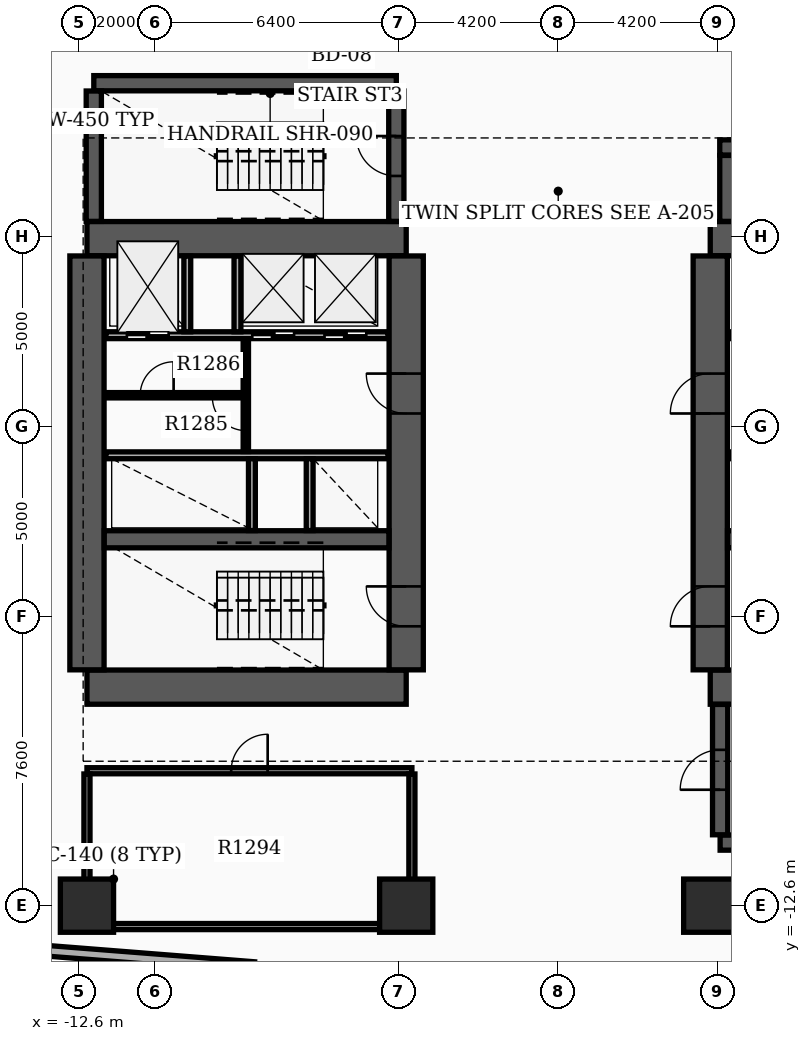
"""IFC4 building model, lengths in metres.
Left out: names, types, materials, properties, quantities, classifications, styles, units other than length and angle.
Written with IfcOpenShell. Run it as: python <this file> out.ifc"""

import sys

from ifc_helpers import new_model, si_unit, direction, frame, frame_2d, origin, origin_2d, place, context, subcontext, project, spatial, rectangle, extrude, element, fill, save


model = new_model("IFC4")
c1 = context("Model", 3, precision=1e-05, world=origin(), true_north=direction((0.0, 1.0)))
c2 = subcontext(c1, "Body", "Model", "MODEL_VIEW")
j1 = project(units=[si_unit("LENGTHUNIT", "METRE"), si_unit("PLANEANGLEUNIT", "RADIAN")], contexts=[c1])
p1 = place(None, origin())
s1 = spatial("IfcSite", under=j1, at=p1, CompositionType="ELEMENT")
p2 = place(p1, origin())
s2 = spatial("IfcBuilding", under=s1, at=p2, CompositionType="ELEMENT")
p3 = place(p2, frame((0.0, 0.0, 83.4)))
s3 = spatial("IfcBuildingStorey", under=s2, at=p3, CompositionType="ELEMENT", Elevation=83.4)
for number, where, z_axis, x_axis in (
    (1, (-12.4, -6.85, 0.0), (0.0, 0.0, 1.0), (1.0, 0.0, 0.0)),
    (2, (-12.4, 4.95, 0.0), (0.0, 0.0, 1.0), (1.0, 0.0, 0.0)),
):
    element("IfcWall", number, at=place(p3, frame(where, z_axis=z_axis, x_axis=x_axis)), inside=s3, PredefinedType="SHEAR", context=c2, shape_type="SweptSolid", body=[
        extrude(rectangle(XDim=8.4, YDim=0.9, at=frame_2d((4.2, 0.0))), origin(), (0.0, 0.0, 1.0), 3.7),
    ])
p4 = place(p3, frame((-12.4, -6.395, 0.0), z_axis=(0.0, 0.0, 1.0), x_axis=(0.0, 1.0, 0.0)))
e3 = element("IfcWall", 3, at=p4, inside=s3, PredefinedType="SHEAR", context=c2, shape_type="SweptSolid", body=[
    extrude(rectangle(XDim=10.89, YDim=0.9, at=frame_2d((5.445, 0.0))), origin(), (0.0, 0.0, 1.0), 3.7),
])
p5 = place(p3, frame((-4.0, -6.395, 0.0), z_axis=(0.0, 0.0, 1.0), x_axis=(0.0, 1.0, 0.0)))
e4 = element("IfcWall", 4, at=p5, inside=s3, PredefinedType="SHEAR", context=c2, shape_type="SweptSolid", body=[
    extrude(rectangle(XDim=10.89, YDim=0.9, at=frame_2d((5.445, 0.0))), origin(), (0.0, 0.0, 1.0), 3.7),
])
p6 = place(p5, frame((1.145, 0.0, 0.0)))
e5 = element("IfcOpeningElement", 5, at=p6, cuts=e4, PredefinedType="OPENING", context=c2, shape_type="SweptSolid", body=[
    extrude(rectangle(XDim=1.05, YDim=2.15, at=frame_2d((0.525, 1.075))), frame((0.0, 0.46, 0.0), z_axis=(0.0, -1.0, 0.0), x_axis=(1.0, 0.0, 0.0)), (0.0, 0.0, 1.0), 0.92),
])
p7 = place(p5, frame((6.745, 0.0, 0.0)))
e6 = element("IfcOpeningElement", 6, at=p7, cuts=e4, PredefinedType="OPENING", context=c2, shape_type="SweptSolid", body=[
    extrude(rectangle(XDim=1.05, YDim=2.15, at=frame_2d((0.525, 1.075))), frame((0.0, 0.46, 0.0), z_axis=(0.0, -1.0, 0.0), x_axis=(1.0, 0.0, 0.0)), (0.0, 0.0, 1.0), 0.92),
])
p8 = place(p3, frame((-11.945, -2.96, 0.0), z_axis=(0.0, 0.0, 1.0), x_axis=(1.0, 0.0, 0.0)))
e7 = element("IfcWall", 7, at=p8, inside=s3, PredefinedType="SHEAR", context=c2, shape_type="SweptSolid", body=[
    extrude(rectangle(XDim=7.49, YDim=0.45, at=frame_2d((3.745, 0.0))), origin(), (0.0, 0.0, 1.0), 3.7),
])
for number, where, z_axis, x_axis in (
    (8, (4.0, -6.85, 0.0), (0.0, 0.0, 1.0), (1.0, 0.0, 0.0)),
    (9, (4.0, 4.95, 0.0), (0.0, 0.0, 1.0), (1.0, 0.0, 0.0)),
):
    element("IfcWall", number, at=place(p3, frame(where, z_axis=z_axis, x_axis=x_axis)), inside=s3, PredefinedType="SHEAR", context=c2, shape_type="SweptSolid", body=[
        extrude(rectangle(XDim=8.4, YDim=0.9, at=frame_2d((4.2, 0.0))), origin(), (0.0, 0.0, 1.0), 3.7),
    ])
p9 = place(p3, frame((4.0, -6.395, 0.0), z_axis=(0.0, 0.0, 1.0), x_axis=(0.0, 1.0, 0.0)))
e10 = element("IfcWall", 10, at=p9, inside=s3, PredefinedType="SHEAR", context=c2, shape_type="SweptSolid", body=[
    extrude(rectangle(XDim=10.89, YDim=0.9, at=frame_2d((5.445, 0.0))), origin(), (0.0, 0.0, 1.0), 3.7),
])
p10 = place(p9, frame((1.145, 0.0, 0.0)))
e11 = element("IfcOpeningElement", 11, at=p10, cuts=e10, PredefinedType="OPENING", context=c2, shape_type="SweptSolid", body=[
    extrude(rectangle(XDim=1.05, YDim=2.15, at=frame_2d((0.525, 1.075))), frame((0.0, 0.46, 0.0), z_axis=(0.0, -1.0, 0.0), x_axis=(1.0, 0.0, 0.0)), (0.0, 0.0, 1.0), 0.92),
])
p11 = place(p9, frame((6.745, 0.0, 0.0)))
e12 = element("IfcOpeningElement", 12, at=p11, cuts=e10, PredefinedType="OPENING", context=c2, shape_type="SweptSolid", body=[
    extrude(rectangle(XDim=1.05, YDim=2.15, at=frame_2d((0.525, 1.075))), frame((0.0, 0.46, 0.0), z_axis=(0.0, -1.0, 0.0), x_axis=(1.0, 0.0, 0.0)), (0.0, 0.0, 1.0), 0.92),
])
p12 = place(p3, frame((4.455, -2.96, 0.0), z_axis=(0.0, 0.0, 1.0), x_axis=(1.0, 0.0, 0.0)))
e13 = element("IfcWall", 13, at=p12, inside=s3, PredefinedType="SHEAR", context=c2, shape_type="SweptSolid", body=[
    extrude(rectangle(XDim=7.49, YDim=0.45, at=frame_2d((3.745, 0.0))), origin(), (0.0, 0.0, 1.0), 3.7),
])
p13 = place(p3, frame((-12.22, 9.04, 0.0), z_axis=(0.0, 0.0, 1.0), x_axis=(1.0, 0.0, 0.0)))
e14 = element("IfcWall", 14, at=p13, inside=s3, PredefinedType="SHEAR", context=c2, shape_type="SweptSolid", body=[
    extrude(rectangle(XDim=7.96, YDim=0.4, at=frame_2d((3.98, 0.0))), origin(), (0.0, 0.0, 1.0), 3.7),
])
p14 = place(p3, frame((-12.22, 5.405, 0.0), z_axis=(0.0, 0.0, 1.0), x_axis=(0.0, 1.0, 0.0)))
e15 = element("IfcWall", 15, at=p14, inside=s3, PredefinedType="SHEAR", context=c2, shape_type="SweptSolid", body=[
    extrude(rectangle(XDim=3.43, YDim=0.4, at=frame_2d((1.715, 0.0))), origin(), (0.0, 0.0, 1.0), 3.7),
])
p15 = place(p3, frame((-4.26, 5.405, 0.0), z_axis=(0.0, 0.0, 1.0), x_axis=(0.0, 1.0, 0.0)))
e16 = element("IfcWall", 16, at=p15, inside=s3, PredefinedType="SHEAR", context=c2, shape_type="SweptSolid", body=[
    extrude(rectangle(XDim=3.43, YDim=0.4, at=frame_2d((1.715, 0.0))), origin(), (0.0, 0.0, 1.0), 3.7),
])
p16 = place(p15, frame((1.195, 0.0, 0.0)))
e17 = element("IfcOpeningElement", 17, at=p16, cuts=e16, PredefinedType="OPENING", context=c2, shape_type="SweptSolid", body=[
    extrude(rectangle(XDim=1.05, YDim=2.15, at=frame_2d((0.525, 1.075))), frame((0.0, 0.21, 0.0), z_axis=(0.0, -1.0, 0.0), x_axis=(1.0, 0.0, 0.0)), (0.0, 0.0, 1.0), 0.42),
])
p17 = place(p3, frame((4.26, -10.94, 0.0), z_axis=(0.0, 0.0, 1.0), x_axis=(1.0, 0.0, 0.0)))
e18 = element("IfcWall", 18, at=p17, inside=s3, PredefinedType="SHEAR", context=c2, shape_type="SweptSolid", body=[
    extrude(rectangle(XDim=7.96, YDim=0.4, at=frame_2d((3.98, 0.0))), origin(), (0.0, 0.0, 1.0), 3.7),
])
p18 = place(p3, frame((4.26, -10.735, 0.0), z_axis=(0.0, 0.0, 1.0), x_axis=(0.0, 1.0, 0.0)))
e19 = element("IfcWall", 19, at=p18, inside=s3, PredefinedType="SHEAR", context=c2, shape_type="SweptSolid", body=[
    extrude(rectangle(XDim=3.43, YDim=0.4, at=frame_2d((1.715, 0.0))), origin(), (0.0, 0.0, 1.0), 3.7),
])
p19 = place(p18, frame((1.185, 0.0, 0.0)))
e20 = element("IfcOpeningElement", 20, at=p19, cuts=e19, PredefinedType="OPENING", context=c2, shape_type="SweptSolid", body=[
    extrude(rectangle(XDim=1.05, YDim=2.15, at=frame_2d((0.525, 1.075))), frame((0.0, 0.21, 0.0), z_axis=(0.0, -1.0, 0.0), x_axis=(1.0, 0.0, 0.0)), (0.0, 0.0, 1.0), 0.42),
])
p20 = place(p3, frame((4.45, 5.405, 0.0), z_axis=(0.0, 0.0, 1.0), x_axis=(0.0, 1.0, 0.0)))
e21 = element("IfcWall", 21, at=p20, inside=s3, PredefinedType="SHEAR", context=c2, shape_type="SweptSolid", body=[
    extrude(rectangle(XDim=1.735, YDim=0.4, at=frame_2d((0.867, 0.0))), origin(), (0.0, 0.0, 1.0), 3.7),
])
p21 = place(p3, frame((4.25, 7.35, 0.0), z_axis=(0.0, 0.0, 1.0), x_axis=(1.0, 0.0, 0.0)))
e22 = element("IfcWall", 22, at=p21, inside=s3, PredefinedType="SHEAR", context=c2, shape_type="SweptSolid", body=[
    extrude(rectangle(XDim=5.4, YDim=0.4, at=frame_2d((2.7, 0.0))), origin(), (0.0, 0.0, 1.0), 3.7),
])
for number, where, z_axis, x_axis in (
    (23, (-12.4, -12.6, 0.0), (0.0, 0.0, 1.0), (1.0, 0.0, 0.0)),
    (24, (-4.0, -12.6, 0.0), (0.0, 0.0, 1.0), (1.0, 0.0, 0.0)),
    (25, (4.0, -12.6, 0.0), (0.0, 0.0, 1.0), (1.0, 0.0, 0.0)),
):
    element("IfcColumn", number, at=place(p3, frame(where, z_axis=z_axis, x_axis=x_axis)), inside=s3, PredefinedType="COLUMN", context=c2, shape_type="SweptSolid", body=[
        extrude(rectangle(XDim=1.4, YDim=1.4, at=origin_2d()), origin(), (0.0, 0.0, 1.0), 3.9),
    ])
p22 = place(p3, frame((-14.281, -13.722, 0.0), z_axis=(0.0, 0.0, 1.0), x_axis=(0.99691915642, -0.078435932851, 0.0)))
e26 = element("IfcWall", 26, at=p22, inside=s3, PredefinedType="STANDARD", context=c2, shape_type="SweptSolid", body=[
    extrude(rectangle(XDim=6.3, YDim=0.28, at=frame_2d((3.15, 0.0))), origin(), (0.0, 0.0, 1.0), 2.91),
])
p23 = place(p3, frame((-11.9, 2.41, 0.0), z_axis=(0.0, 0.0, 1.0), x_axis=(1.0, 0.0, 0.0)))
e27 = element("IfcWall", 27, at=p23, inside=s3, PredefinedType="SOLIDWALL", context=c2, shape_type="SweptSolid", body=[
    extrude(rectangle(XDim=7.42, YDim=0.18, at=frame_2d((3.71, 0.0))), origin(), (0.0, 0.0, 1.0), 2.9),
])
p24 = place(p23, frame((0.55, 0.0, 0.0)))
e28 = element("IfcOpeningElement", 28, at=p24, cuts=e27, PredefinedType="OPENING", context=c2, shape_type="SweptSolid", body=[
    extrude(rectangle(XDim=1.1, YDim=2.15, at=frame_2d((0.55, 1.075))), frame((0.0, 0.1, 0.0), z_axis=(0.0, -1.0, 0.0), x_axis=(1.0, 0.0, 0.0)), (0.0, 0.0, 1.0), 0.2),
])
p25 = place(p23, frame((3.85, 0.0, 0.0)))
e29 = element("IfcOpeningElement", 29, at=p25, cuts=e27, PredefinedType="OPENING", context=c2, shape_type="SweptSolid", body=[
    extrude(rectangle(XDim=1.1, YDim=2.15, at=frame_2d((0.55, 1.075))), frame((0.0, 0.1, 0.0), z_axis=(0.0, -1.0, 0.0), x_axis=(1.0, 0.0, 0.0)), (0.0, 0.0, 1.0), 0.2),
])
p26 = place(p23, frame((5.75, 0.0, 0.0)))
e30 = element("IfcOpeningElement", 30, at=p26, cuts=e27, PredefinedType="OPENING", context=c2, shape_type="SweptSolid", body=[
    extrude(rectangle(XDim=1.1, YDim=2.15, at=frame_2d((0.55, 1.075))), frame((0.0, 0.1, 0.0), z_axis=(0.0, -1.0, 0.0), x_axis=(1.0, 0.0, 0.0)), (0.0, 0.0, 1.0), 0.2),
])
p27 = place(p3, frame((4.48, 2.41, 0.0), z_axis=(0.0, 0.0, 1.0), x_axis=(1.0, 0.0, 0.0)))
e31 = element("IfcWall", 31, at=p27, inside=s3, PredefinedType="SOLIDWALL", context=c2, shape_type="SweptSolid", body=[
    extrude(rectangle(XDim=7.42, YDim=0.18, at=frame_2d((3.71, 0.0))), origin(), (0.0, 0.0, 1.0), 2.9),
])
p28 = place(p27, frame((5.67, 0.0, 0.0)))
e32 = element("IfcOpeningElement", 32, at=p28, cuts=e31, PredefinedType="OPENING", context=c2, shape_type="SweptSolid", body=[
    extrude(rectangle(XDim=1.1, YDim=2.15, at=frame_2d((0.55, 1.075))), frame((0.0, 0.1, 0.0), z_axis=(0.0, -1.0, 0.0), x_axis=(1.0, 0.0, 0.0)), (0.0, 0.0, 1.0), 0.2),
])
p29 = place(p27, frame((0.52, 0.0, 0.0)))
e33 = element("IfcOpeningElement", 33, at=p29, cuts=e31, PredefinedType="OPENING", context=c2, shape_type="SweptSolid", body=[
    extrude(rectangle(XDim=1.1, YDim=2.15, at=frame_2d((0.55, 1.075))), frame((0.0, 0.1, 0.0), z_axis=(0.0, -1.0, 0.0), x_axis=(1.0, 0.0, 0.0)), (0.0, 0.0, 1.0), 0.2),
])
p30 = place(p27, frame((2.42, 0.0, 0.0)))
e34 = element("IfcOpeningElement", 34, at=p30, cuts=e31, PredefinedType="OPENING", context=c2, shape_type="SweptSolid", body=[
    extrude(rectangle(XDim=1.1, YDim=2.15, at=frame_2d((0.55, 1.075))), frame((0.0, 0.1, 0.0), z_axis=(0.0, -1.0, 0.0), x_axis=(1.0, 0.0, 0.0)), (0.0, 0.0, 1.0), 0.2),
])
for number, where, z_axis, x_axis in (
    (35, (-11.9, -0.75, 0.0), (0.0, 0.0, 1.0), (1.0, 0.0, 0.0)),
    (36, (4.48, -0.75, 0.0), (0.0, 0.0, 1.0), (1.0, 0.0, 0.0)),
):
    element("IfcWall", number, at=place(p3, frame(where, z_axis=z_axis, x_axis=x_axis)), inside=s3, PredefinedType="SOLIDWALL", context=c2, shape_type="SweptSolid", body=[
        extrude(rectangle(XDim=7.42, YDim=0.18, at=frame_2d((3.71, 0.0))), origin(), (0.0, 0.0, 1.0), 2.9),
    ])
for number, where, z_axis, x_axis in (
    (37, (-9.76, 2.5, 0.0), (0.0, 0.0, 1.0), (0.0, 1.0, 0.0)),
    (38, (-8.44, 2.5, 0.0), (0.0, 0.0, 1.0), (0.0, 1.0, 0.0)),
):
    element("IfcWall", number, at=place(p3, frame(where, z_axis=z_axis, x_axis=x_axis)), inside=s3, PredefinedType="SOLIDWALL", context=c2, shape_type="SweptSolid", body=[
        extrude(rectangle(XDim=1.99, YDim=0.18, at=frame_2d((0.995, 0.0))), origin(), (0.0, 0.0, 1.0), 2.9),
    ])
for number, where, z_axis, x_axis in (
    (39, (-8.06, -2.73, 0.0), (0.0, 0.0, 1.0), (0.0, 1.0, 0.0)),
    (40, (-6.54, -2.73, 0.0), (0.0, 0.0, 1.0), (0.0, 1.0, 0.0)),
):
    element("IfcWall", number, at=place(p3, frame(where, z_axis=z_axis, x_axis=x_axis)), inside=s3, PredefinedType="SOLIDWALL", context=c2, shape_type="SweptSolid", body=[
        extrude(rectangle(XDim=1.89, YDim=0.18, at=frame_2d((0.945, 0.0))), origin(), (0.0, 0.0, 1.0), 2.9),
    ])
p31 = place(p3, frame((-8.22, -0.65, 0.0), z_axis=(0.0, 0.0, 1.0), x_axis=(0.0, 1.0, 0.0)))
e41 = element("IfcWall", 41, at=p31, inside=s3, PredefinedType="SOLIDWALL", context=c2, shape_type="SweptSolid", body=[
    extrude(rectangle(XDim=2.96, YDim=0.14, at=frame_2d((1.48, 0.0))), origin(), (0.0, 0.0, 1.0), 2.9),
])
p32 = place(p31, frame((0.55, 0.0, 0.0)))
e42 = element("IfcOpeningElement", 42, at=p32, cuts=e41, PredefinedType="OPENING", context=c2, shape_type="SweptSolid", body=[
    extrude(rectangle(XDim=0.88, YDim=2.1, at=frame_2d((0.44, 1.05))), frame((0.0, 0.08, 0.0), z_axis=(0.0, -1.0, 0.0), x_axis=(1.0, 0.0, 0.0)), (0.0, 0.0, 1.0), 0.16),
])
p33 = place(p3, frame((-11.85, 0.83, 0.0), z_axis=(0.0, 0.0, 1.0), x_axis=(1.0, 0.0, 0.0)))
e43 = element("IfcWall", 43, at=p33, inside=s3, PredefinedType="PARTITIONING", context=c2, shape_type="SweptSolid", body=[
    extrude(rectangle(XDim=3.552, YDim=0.14, at=frame_2d((1.776, 0.0))), origin(), (0.0, 0.0, 1.0), 2.9),
])
p34 = place(p33, frame((0.85, 0.0, 0.0)))
e44 = element("IfcOpeningElement", 44, at=p34, cuts=e43, PredefinedType="OPENING", context=c2, shape_type="SweptSolid", body=[
    extrude(rectangle(XDim=0.88, YDim=2.1, at=frame_2d((0.44, 1.05))), frame((0.0, 0.08, 0.0), z_axis=(0.0, -1.0, 0.0), x_axis=(1.0, 0.0, 0.0)), (0.0, 0.0, 1.0), 0.16),
])
p35 = place(p3, frame((-12.4, -13.15, 0.0), z_axis=(0.0, 0.0, 1.0), x_axis=(1.0, 0.0, 0.0)))
e45 = element("IfcWall", 45, at=p35, inside=s3, PredefinedType="PARTITIONING", context=c2, shape_type="SweptSolid", body=[
    extrude(rectangle(XDim=8.55, YDim=0.16, at=frame_2d((4.275, 0.0))), origin(), (0.0, 0.0, 1.0), 2.9),
])
p36 = place(p3, frame((-12.4, -9.05, 0.0), z_axis=(0.0, 0.0, 1.0), x_axis=(1.0, 0.0, 0.0)))
e46 = element("IfcWall", 46, at=p36, inside=s3, PredefinedType="PARTITIONING", context=c2, shape_type="SweptSolid", body=[
    extrude(rectangle(XDim=8.55, YDim=0.16, at=frame_2d((4.275, 0.0))), origin(), (0.0, 0.0, 1.0), 2.9),
])
p37 = place(p36, frame((3.795, 0.0, 0.0)))
e47 = element("IfcOpeningElement", 47, at=p37, cuts=e46, PredefinedType="OPENING", context=c2, shape_type="SweptSolid", body=[
    extrude(rectangle(XDim=0.96, YDim=2.15, at=frame_2d((0.48, 1.075))), frame((0.0, 0.09, 0.0), z_axis=(0.0, -1.0, 0.0), x_axis=(1.0, 0.0, 0.0)), (0.0, 0.0, 1.0), 0.18),
])
for number, where, z_axis, x_axis in (
    (48, (-12.4, -13.065, 0.0), (0.0, 0.0, 1.0), (0.0, 1.0, 0.0)),
    (49, (-3.85, -13.065, 0.0), (0.0, 0.0, 1.0), (0.0, 1.0, 0.0)),
):
    element("IfcWall", number, at=place(p3, frame(where, z_axis=z_axis, x_axis=x_axis)), inside=s3, PredefinedType="PARTITIONING", context=c2, shape_type="SweptSolid", body=[
        extrude(rectangle(XDim=3.93, YDim=0.16, at=frame_2d((1.965, 0.0))), origin(), (0.0, 0.0, 1.0), 2.9),
    ])
p38 = place(p6, origin())
e50 = element("IfcDoor", 50, at=p38, inside=s3, OperationType="SINGLE_SWING_RIGHT", PredefinedType="DOOR", context=c2, shape_type="SweptSolid", body=[
    extrude(rectangle(XDim=1.05, YDim=2.15, at=frame_2d((0.525, 1.075))), frame((0.0, 0.025, 0.0), z_axis=(0.0, -1.0, 0.0), x_axis=(1.0, 0.0, 0.0)), (0.0, 0.0, 1.0), 0.05),
])
fill(e5, e50)
p39 = place(p10, origin())
e51 = element("IfcDoor", 51, at=p39, inside=s3, OperationType="SINGLE_SWING_LEFT", PredefinedType="DOOR", context=c2, shape_type="SweptSolid", body=[
    extrude(rectangle(XDim=1.05, YDim=2.15, at=frame_2d((0.525, 1.075))), frame((0.0, 0.025, 0.0), z_axis=(0.0, -1.0, 0.0), x_axis=(1.0, 0.0, 0.0)), (0.0, 0.0, 1.0), 0.05),
])
fill(e11, e51)
p40 = place(p7, origin())
e52 = element("IfcDoor", 52, at=p40, inside=s3, OperationType="SINGLE_SWING_RIGHT", PredefinedType="DOOR", context=c2, shape_type="SweptSolid", body=[
    extrude(rectangle(XDim=1.05, YDim=2.15, at=frame_2d((0.525, 1.075))), frame((0.0, 0.025, 0.0), z_axis=(0.0, -1.0, 0.0), x_axis=(1.0, 0.0, 0.0)), (0.0, 0.0, 1.0), 0.05),
])
fill(e6, e52)
p41 = place(p11, origin())
e53 = element("IfcDoor", 53, at=p41, inside=s3, OperationType="SINGLE_SWING_LEFT", PredefinedType="DOOR", context=c2, shape_type="SweptSolid", body=[
    extrude(rectangle(XDim=1.05, YDim=2.15, at=frame_2d((0.525, 1.075))), frame((0.0, 0.025, 0.0), z_axis=(0.0, -1.0, 0.0), x_axis=(1.0, 0.0, 0.0)), (0.0, 0.0, 1.0), 0.05),
])
fill(e12, e53)
p42 = place(p16, origin())
e54 = element("IfcDoor", 54, at=p42, inside=s3, OperationType="SINGLE_SWING_RIGHT", PredefinedType="DOOR", context=c2, shape_type="SweptSolid", body=[
    extrude(rectangle(XDim=1.05, YDim=2.15, at=frame_2d((0.525, 1.075))), frame((0.0, 0.025, 0.0), z_axis=(0.0, -1.0, 0.0), x_axis=(1.0, 0.0, 0.0)), (0.0, 0.0, 1.0), 0.05),
])
fill(e17, e54)
p43 = place(p19, origin())
e55 = element("IfcDoor", 55, at=p43, inside=s3, OperationType="SINGLE_SWING_LEFT", PredefinedType="DOOR", context=c2, shape_type="SweptSolid", body=[
    extrude(rectangle(XDim=1.05, YDim=2.15, at=frame_2d((0.525, 1.075))), frame((0.0, 0.025, 0.0), z_axis=(0.0, -1.0, 0.0), x_axis=(1.0, 0.0, 0.0)), (0.0, 0.0, 1.0), 0.05),
])
fill(e20, e55)
p44 = place(p24, origin())
e56 = element("IfcDoor", 56, at=p44, inside=s3, OperationType="DOUBLE_DOOR_SLIDING", PredefinedType="DOOR", context=c2, shape_type="SweptSolid", body=[
    extrude(rectangle(XDim=1.1, YDim=2.15, at=frame_2d((0.55, 1.075))), frame((0.0, 0.025, 0.0), z_axis=(0.0, -1.0, 0.0), x_axis=(1.0, 0.0, 0.0)), (0.0, 0.0, 1.0), 0.05),
])
fill(e28, e56)
p45 = place(p25, origin())
e57 = element("IfcDoor", 57, at=p45, inside=s3, OperationType="DOUBLE_DOOR_SLIDING", PredefinedType="DOOR", context=c2, shape_type="SweptSolid", body=[
    extrude(rectangle(XDim=1.1, YDim=2.15, at=frame_2d((0.55, 1.075))), frame((0.0, 0.025, 0.0), z_axis=(0.0, -1.0, 0.0), x_axis=(1.0, 0.0, 0.0)), (0.0, 0.0, 1.0), 0.05),
])
fill(e29, e57)
p46 = place(p26, origin())
e58 = element("IfcDoor", 58, at=p46, inside=s3, OperationType="DOUBLE_DOOR_SLIDING", PredefinedType="DOOR", context=c2, shape_type="SweptSolid", body=[
    extrude(rectangle(XDim=1.1, YDim=2.15, at=frame_2d((0.55, 1.075))), frame((0.0, 0.025, 0.0), z_axis=(0.0, -1.0, 0.0), x_axis=(1.0, 0.0, 0.0)), (0.0, 0.0, 1.0), 0.05),
])
fill(e30, e58)
p47 = place(p32, origin())
e59 = element("IfcDoor", 59, at=p47, inside=s3, OperationType="SINGLE_SWING_RIGHT", PredefinedType="DOOR", context=c2, shape_type="SweptSolid", body=[
    extrude(rectangle(XDim=0.88, YDim=2.1, at=frame_2d((0.44, 1.05))), frame((0.0, 0.025, 0.0), z_axis=(0.0, -1.0, 0.0), x_axis=(1.0, 0.0, 0.0)), (0.0, 0.0, 1.0), 0.05),
])
fill(e42, e59)
p48 = place(p34, origin())
e60 = element("IfcDoor", 60, at=p48, inside=s3, OperationType="SINGLE_SWING_RIGHT", PredefinedType="DOOR", context=c2, shape_type="SweptSolid", body=[
    extrude(rectangle(XDim=0.88, YDim=2.1, at=frame_2d((0.44, 1.05))), frame((0.0, 0.025, 0.0), z_axis=(0.0, -1.0, 0.0), x_axis=(1.0, 0.0, 0.0)), (0.0, 0.0, 1.0), 0.05),
])
fill(e44, e60)
p49 = place(p37, origin())
e61 = element("IfcDoor", 61, at=p49, inside=s3, OperationType="SINGLE_SWING_RIGHT", PredefinedType="DOOR", context=c2, shape_type="SweptSolid", body=[
    extrude(rectangle(XDim=0.96, YDim=2.15, at=frame_2d((0.48, 1.075))), frame((0.0, 0.025, 0.0), z_axis=(0.0, -1.0, 0.0), x_axis=(1.0, 0.0, 0.0)), (0.0, 0.0, 1.0), 0.05),
])
fill(e47, e61)
save(model, sys.argv[1])
